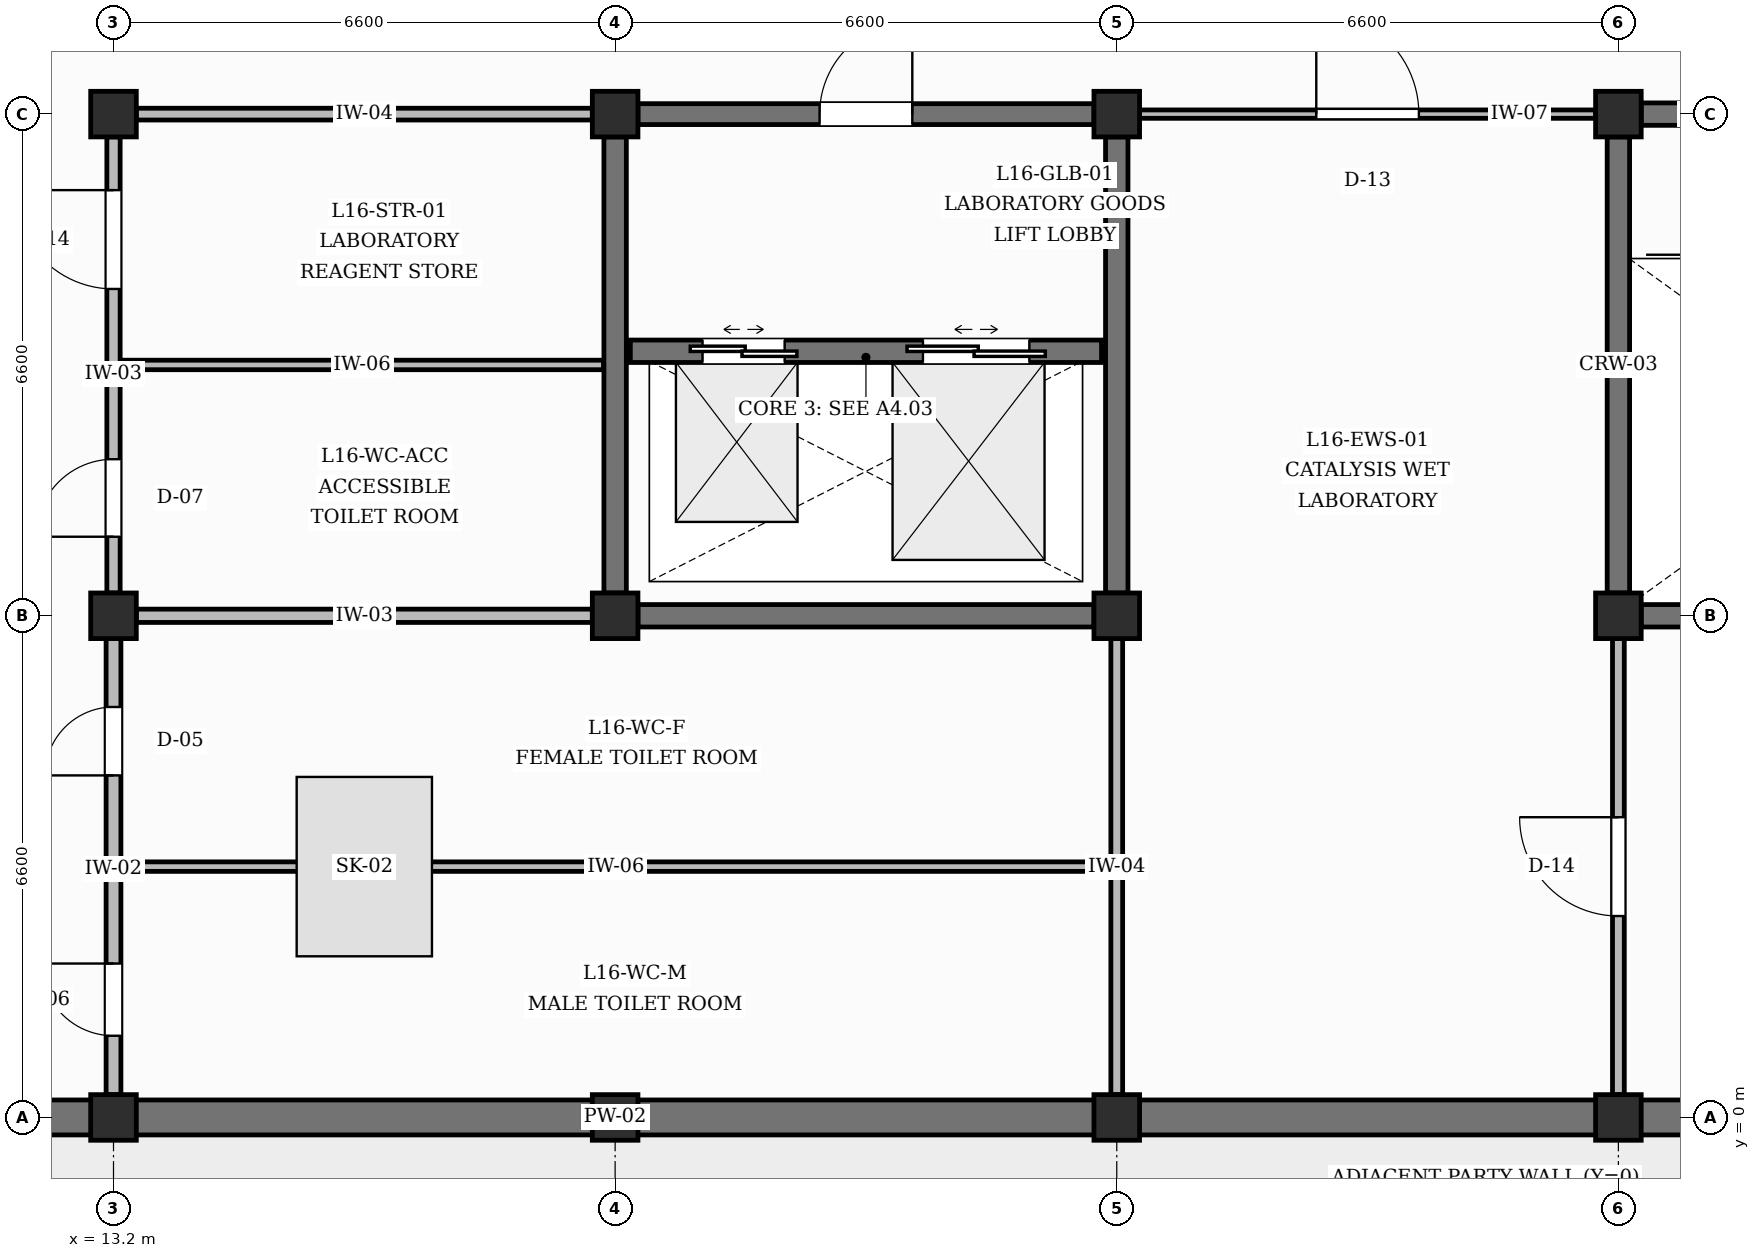
"""IFC4 building model, lengths in metres.
Left out: names, types, materials, properties, quantities, classifications, styles, units other than length and angle.
Written with IfcOpenShell. Run it as: python <this file> out.ifc"""

import sys

from ifc_helpers import new_model, si_unit, direction, frame, frame_2d, origin, origin_2d, place, context, subcontext, project, spatial, rectangle, extrude, element, fill, save


model = new_model("IFC4")
c1 = context("Model", 3, precision=1e-05, world=origin(), true_north=direction((0.0, 1.0)))
c2 = subcontext(c1, "Body", "Model", "MODEL_VIEW")
j1 = project(units=[si_unit("LENGTHUNIT", "METRE"), si_unit("PLANEANGLEUNIT", "RADIAN")], contexts=[c1])
p1 = place(None, origin())
s1 = spatial("IfcSite", under=j1, at=p1, CompositionType="ELEMENT")
p2 = place(p1, origin())
s2 = spatial("IfcBuilding", under=s1, at=p2, CompositionType="ELEMENT")
p3 = place(p2, frame((0.0, 0.0, 69.0)))
s3 = spatial("IfcBuildingStorey", under=s2, at=p3, CompositionType="ELEMENT", Elevation=69.0)
for number, where, z_axis, x_axis in (
    (1, (13.2, 0.0, 0.0), (0.0, 0.0, 1.0), (1.0, 0.0, 0.0)),
    (2, (13.2, 6.6, 0.0), (0.0, 0.0, 1.0), (1.0, 0.0, 0.0)),
    (3, (13.2, 13.2, 0.0), (0.0, 0.0, 1.0), (1.0, 0.0, 0.0)),
    (4, (19.8, 0.0, 0.0), (0.0, 0.0, 1.0), (1.0, 0.0, 0.0)),
    (5, (19.8, 6.6, 0.0), (0.0, 0.0, 1.0), (1.0, 0.0, 0.0)),
    (6, (19.8, 13.2, 0.0), (0.0, 0.0, 1.0), (1.0, 0.0, 0.0)),
    (7, (26.4, 0.0, 0.0), (0.0, 0.0, 1.0), (1.0, 0.0, 0.0)),
    (8, (26.4, 6.6, 0.0), (0.0, 0.0, 1.0), (1.0, 0.0, 0.0)),
    (9, (26.4, 13.2, 0.0), (0.0, 0.0, 1.0), (1.0, 0.0, 0.0)),
    (10, (33.0, 0.0, 0.0), (0.0, 0.0, 1.0), (1.0, 0.0, 0.0)),
    (11, (33.0, 6.6, 0.0), (0.0, 0.0, 1.0), (1.0, 0.0, 0.0)),
    (12, (33.0, 13.2, 0.0), (0.0, 0.0, 1.0), (1.0, 0.0, 0.0)),
):
    element("IfcColumn", number, at=place(p3, frame(where, z_axis=z_axis, x_axis=x_axis)), inside=s3, PredefinedType="COLUMN", context=c2, shape_type="SweptSolid", body=[
        extrude(rectangle(XDim=0.6, YDim=0.6, at=origin_2d()), origin(), (0.0, 0.0, 1.0), 4.2),
    ])
for number, where, z_axis, x_axis in (
    (13, (6.9, 0.0, 0.0), (0.0, 0.0, 1.0), (1.0, 0.0, 0.0)),
    (14, (13.5, 0.0, 0.0), (0.0, 0.0, 1.0), (1.0, 0.0, 0.0)),
    (15, (20.1, 0.0, 0.0), (0.0, 0.0, 1.0), (1.0, 0.0, 0.0)),
    (16, (26.7, 0.0, 0.0), (0.0, 0.0, 1.0), (1.0, 0.0, 0.0)),
    (17, (33.3, 0.0, 0.0), (0.0, 0.0, 1.0), (1.0, 0.0, 0.0)),
):
    element("IfcWall", number, at=place(p3, frame(where, z_axis=z_axis, x_axis=x_axis)), inside=s3, PredefinedType="SOLIDWALL", context=c2, shape_type="SweptSolid", body=[
        extrude(rectangle(XDim=6.0, YDim=0.46, at=frame_2d((3.0, 0.0))), origin(), (0.0, 0.0, 1.0), 3.32),
    ])
p4 = place(p3, frame((33.3, 6.6, 0.0), z_axis=(0.0, 0.0, 1.0), x_axis=(1.0, 0.0, 0.0)))
e18 = element("IfcWall", 18, at=p4, inside=s3, PredefinedType="SHEAR", context=c2, shape_type="SweptSolid", body=[
    extrude(rectangle(XDim=6.0, YDim=0.295, at=frame_2d((3.0, 0.0))), origin(), (0.0, 0.0, 1.0), 3.56),
])
p5 = place(p3, frame((33.3, 13.2, 0.0), z_axis=(0.0, 0.0, 1.0), x_axis=(1.0, 0.0, 0.0)))
e19 = element("IfcWall", 19, at=p5, inside=s3, PredefinedType="SHEAR", context=c2, shape_type="SweptSolid", body=[
    extrude(rectangle(XDim=6.0, YDim=0.295, at=frame_2d((3.0, 0.0))), origin(), (0.0, 0.0, 1.0), 3.56),
])
p6 = place(p5, frame((2.425, 0.0, 0.0)))
e20 = element("IfcOpeningElement", 20, at=p6, cuts=e19, PredefinedType="OPENING", context=c2, shape_type="SweptSolid", body=[
    extrude(rectangle(XDim=1.15, YDim=2.2, at=frame_2d((0.575, 1.1))), frame((0.0, 0.157, 0.0), z_axis=(0.0, -1.0, 0.0), x_axis=(1.0, 0.0, 0.0)), (0.0, 0.0, 1.0), 0.315),
])
p7 = place(p3, frame((33.0, 6.9, 0.0), z_axis=(0.0, 0.0, 1.0), x_axis=(0.0, 1.0, 0.0)))
e21 = element("IfcWall", 21, at=p7, inside=s3, PredefinedType="SHEAR", context=c2, shape_type="SweptSolid", body=[
    extrude(rectangle(XDim=6.0, YDim=0.295, at=frame_2d((3.0, 0.0))), origin(), (0.0, 0.0, 1.0), 3.62),
])
p8 = place(p3, frame((20.1, 6.6, 0.0), z_axis=(0.0, 0.0, 1.0), x_axis=(1.0, 0.0, 0.0)))
e22 = element("IfcWall", 22, at=p8, inside=s3, PredefinedType="SHEAR", context=c2, shape_type="SweptSolid", body=[
    extrude(rectangle(XDim=6.0, YDim=0.295, at=frame_2d((3.0, 0.0))), origin(), (0.0, 0.0, 1.0), 3.56),
])
for number, where, z_axis, x_axis in (
    (23, (19.8, 6.9, 0.0), (0.0, 0.0, 1.0), (0.0, 1.0, 0.0)),
    (24, (26.4, 6.9, 0.0), (0.0, 0.0, 1.0), (0.0, 1.0, 0.0)),
):
    element("IfcWall", number, at=place(p3, frame(where, z_axis=z_axis, x_axis=x_axis)), inside=s3, PredefinedType="SHEAR", context=c2, shape_type="SweptSolid", body=[
        extrude(rectangle(XDim=6.0, YDim=0.295, at=frame_2d((3.0, 0.0))), origin(), (0.0, 0.0, 1.0), 3.62),
    ])
p9 = place(p3, frame((20.1, 13.2, 0.0), z_axis=(0.0, 0.0, 1.0), x_axis=(1.0, 0.0, 0.0)))
e25 = element("IfcWall", 25, at=p9, inside=s3, PredefinedType="SHEAR", context=c2, shape_type="SweptSolid", body=[
    extrude(rectangle(XDim=6.0, YDim=0.275, at=frame_2d((3.0, 0.0))), origin(), (0.0, 0.0, 1.0), 3.56),
])
p10 = place(p9, frame((2.39, 0.0, 0.0)))
e26 = element("IfcOpeningElement", 26, at=p10, cuts=e25, PredefinedType="OPENING", context=c2, shape_type="SweptSolid", body=[
    extrude(rectangle(XDim=1.22, YDim=2.15, at=frame_2d((0.61, 1.075))), frame((0.0, 0.147, 0.0), z_axis=(0.0, -1.0, 0.0), x_axis=(1.0, 0.0, 0.0)), (0.0, 0.0, 1.0), 0.295),
])
p11 = place(p3, frame((20.0, 10.08, 0.0), z_axis=(0.0, 0.0, 1.0), x_axis=(1.0, 0.0, 0.0)))
e27 = element("IfcWall", 27, at=p11, inside=s3, PredefinedType="SHEAR", context=c2, shape_type="SweptSolid", body=[
    extrude(rectangle(XDim=6.2, YDim=0.295, at=frame_2d((3.1, 0.0))), origin(), (0.0, 0.0, 1.0), 3.92),
])
p12 = place(p11, frame((0.95, 0.0, 0.0)))
e28 = element("IfcOpeningElement", 28, at=p12, cuts=e27, PredefinedType="OPENING", context=c2, shape_type="SweptSolid", body=[
    extrude(rectangle(XDim=1.08, YDim=2.15, at=frame_2d((0.54, 1.075))), frame((0.0, 0.157, 0.0), z_axis=(0.0, -1.0, 0.0), x_axis=(1.0, 0.0, 0.0)), (0.0, 0.0, 1.0), 0.315),
])
p13 = place(p11, frame((3.85, 0.0, 0.0)))
e29 = element("IfcOpeningElement", 29, at=p13, cuts=e27, PredefinedType="OPENING", context=c2, shape_type="SweptSolid", body=[
    extrude(rectangle(XDim=1.4, YDim=2.35, at=frame_2d((0.7, 1.175))), frame((0.0, 0.157, 0.0), z_axis=(0.0, -1.0, 0.0), x_axis=(1.0, 0.0, 0.0)), (0.0, 0.0, 1.0), 0.315),
])
p14 = place(p3, frame((13.2, 0.3, 0.0), z_axis=(0.0, 0.0, 1.0), x_axis=(0.0, 1.0, 0.0)))
e30 = element("IfcWall", 30, at=p14, inside=s3, PredefinedType="PARTITIONING", context=c2, shape_type="SweptSolid", body=[
    extrude(rectangle(XDim=6.0, YDim=0.195, at=frame_2d((3.0, 0.0))), origin(), (0.0, 0.0, 1.0), 3.62),
])
p15 = place(p14, frame((0.775, 0.0, 0.0)))
e31 = element("IfcOpeningElement", 31, at=p15, cuts=e30, PredefinedType="OPENING", context=c2, shape_type="SweptSolid", body=[
    extrude(rectangle(XDim=0.95, YDim=2.1, at=frame_2d((0.475, 1.05))), frame((0.0, 0.107, 0.0), z_axis=(0.0, -1.0, 0.0), x_axis=(1.0, 0.0, 0.0)), (0.0, 0.0, 1.0), 0.215),
])
p16 = place(p14, frame((4.2, 0.0, 0.0)))
e32 = element("IfcOpeningElement", 32, at=p16, cuts=e30, PredefinedType="OPENING", context=c2, shape_type="SweptSolid", body=[
    extrude(rectangle(XDim=0.9, YDim=2.1, at=frame_2d((0.45, 1.05))), frame((0.0, 0.107, 0.0), z_axis=(0.0, -1.0, 0.0), x_axis=(1.0, 0.0, 0.0)), (0.0, 0.0, 1.0), 0.215),
])
p17 = place(p3, frame((26.4, 0.3, 0.0), z_axis=(0.0, 0.0, 1.0), x_axis=(0.0, 1.0, 0.0)))
e33 = element("IfcWall", 33, at=p17, inside=s3, PredefinedType="PARTITIONING", context=c2, shape_type="SweptSolid", body=[
    extrude(rectangle(XDim=6.0, YDim=0.155, at=frame_2d((3.0, 0.0))), origin(), (0.0, 0.0, 1.0), 3.62),
])
p18 = place(p3, frame((13.5, 6.6, 0.0), z_axis=(0.0, 0.0, 1.0), x_axis=(1.0, 0.0, 0.0)))
e34 = element("IfcWall", 34, at=p18, inside=s3, PredefinedType="PARTITIONING", context=c2, shape_type="SweptSolid", body=[
    extrude(rectangle(XDim=6.0, YDim=0.175, at=frame_2d((3.0, 0.0))), origin(), (0.0, 0.0, 1.0), 3.56),
])
p19 = place(p3, frame((13.2, 6.9, 0.0), z_axis=(0.0, 0.0, 1.0), x_axis=(0.0, 1.0, 0.0)))
e35 = element("IfcWall", 35, at=p19, inside=s3, PredefinedType="PARTITIONING", context=c2, shape_type="SweptSolid", body=[
    extrude(rectangle(XDim=6.0, YDim=0.175, at=frame_2d((3.0, 0.0))), origin(), (0.0, 0.0, 1.0), 3.62),
])
p20 = place(p19, frame((0.74, 0.0, 0.0)))
e36 = element("IfcOpeningElement", 36, at=p20, cuts=e35, PredefinedType="OPENING", context=c2, shape_type="SweptSolid", body=[
    extrude(rectangle(XDim=1.02, YDim=2.15, at=frame_2d((0.51, 1.075))), frame((0.0, 0.097, 0.0), z_axis=(0.0, -1.0, 0.0), x_axis=(1.0, 0.0, 0.0)), (0.0, 0.0, 1.0), 0.195),
])
p21 = place(p19, frame((4.0, 0.0, 0.0)))
e37 = element("IfcOpeningElement", 37, at=p21, cuts=e35, PredefinedType="OPENING", context=c2, shape_type="SweptSolid", body=[
    extrude(rectangle(XDim=1.3, YDim=2.3, at=frame_2d((0.65, 1.15))), frame((0.0, 0.097, 0.0), z_axis=(0.0, -1.0, 0.0), x_axis=(1.0, 0.0, 0.0)), (0.0, 0.0, 1.0), 0.195),
])
p22 = place(p3, frame((13.5, 13.2, 0.0), z_axis=(0.0, 0.0, 1.0), x_axis=(1.0, 0.0, 0.0)))
e38 = element("IfcWall", 38, at=p22, inside=s3, PredefinedType="PARTITIONING", context=c2, shape_type="SweptSolid", body=[
    extrude(rectangle(XDim=6.0, YDim=0.155, at=frame_2d((3.0, 0.0))), origin(), (0.0, 0.0, 1.0), 3.56),
])
p23 = place(p3, frame((33.0, 0.3, 0.0), z_axis=(0.0, 0.0, 1.0), x_axis=(0.0, 1.0, 0.0)))
e39 = element("IfcWall", 39, at=p23, inside=s3, PredefinedType="PARTITIONING", context=c2, shape_type="SweptSolid", body=[
    extrude(rectangle(XDim=6.0, YDim=0.155, at=frame_2d((3.0, 0.0))), origin(), (0.0, 0.0, 1.0), 3.62),
])
p24 = place(p23, frame((2.35, 0.0, 0.0)))
e40 = element("IfcOpeningElement", 40, at=p24, cuts=e39, PredefinedType="OPENING", context=c2, shape_type="SweptSolid", body=[
    extrude(rectangle(XDim=1.3, YDim=2.3, at=frame_2d((0.65, 1.15))), frame((0.0, 0.087, 0.0), z_axis=(0.0, -1.0, 0.0), x_axis=(1.0, 0.0, 0.0)), (0.0, 0.0, 1.0), 0.175),
])
p25 = place(p3, frame((26.7, 13.2, 0.0), z_axis=(0.0, 0.0, 1.0), x_axis=(1.0, 0.0, 0.0)))
e41 = element("IfcWall", 41, at=p25, inside=s3, PredefinedType="PARTITIONING", context=c2, shape_type="SweptSolid", body=[
    extrude(rectangle(XDim=6.0, YDim=0.11, at=frame_2d((3.0, 0.0))), origin(), (0.0, 0.0, 1.0), 3.56),
])
p26 = place(p25, frame((2.325, 0.0, 0.0)))
e42 = element("IfcOpeningElement", 42, at=p26, cuts=e41, PredefinedType="OPENING", context=c2, shape_type="SweptSolid", body=[
    extrude(rectangle(XDim=1.35, YDim=2.3, at=frame_2d((0.675, 1.15))), frame((0.0, 0.065, 0.0), z_axis=(0.0, -1.0, 0.0), x_axis=(1.0, 0.0, 0.0)), (0.0, 0.0, 1.0), 0.13),
])
p27 = place(p3, frame((13.302, 3.3, 0.0), z_axis=(0.0, 0.0, 1.0), x_axis=(1.0, 0.0, 0.0)))
e43 = element("IfcWall", 43, at=p27, inside=s3, PredefinedType="PARTITIONING", context=c2, shape_type="SweptSolid", body=[
    extrude(rectangle(XDim=13.015, YDim=0.125, at=frame_2d((6.507, 0.0))), origin(), (0.0, 0.0, 1.0), 3.92),
])
p28 = place(p3, frame((13.292, 9.9, 0.0), z_axis=(0.0, 0.0, 1.0), x_axis=(1.0, 0.0, 0.0)))
e44 = element("IfcWall", 44, at=p28, inside=s3, PredefinedType="PARTITIONING", context=c2, shape_type="SweptSolid", body=[
    extrude(rectangle(XDim=6.355, YDim=0.125, at=frame_2d((3.177, 0.0))), origin(), (0.0, 0.0, 1.0), 3.92),
])
p29 = place(p2, frame((0.0, 0.0, 73.2)))
p30 = place(p29, frame((0.0, 0.0, -0.28)))
p31 = place(p30, frame((16.5, 3.3, 0.23)))
e45 = element("IfcWindow", 45, at=p31, inside=s3, PartitioningType="SINGLE_PANEL", PredefinedType="SKYLIGHT", context=c2, shape_type="SweptSolid", body=[
    extrude(rectangle(XDim=1.78, YDim=2.36, at=origin_2d()), origin(), (0.0, 0.0, 1.0), 0.05),
])
p32 = place(p12, origin())
e46 = element("IfcDoor", 46, at=p32, inside=s3, OperationType="DOUBLE_DOOR_SLIDING", PredefinedType="USERDEFINED", context=c2, shape_type="SweptSolid", body=[
    extrude(rectangle(XDim=1.08, YDim=2.15, at=frame_2d((0.54, 1.075))), frame((0.0, 0.025, 0.0), z_axis=(0.0, -1.0, 0.0), x_axis=(1.0, 0.0, 0.0)), (0.0, 0.0, 1.0), 0.05),
])
fill(e28, e46)
p33 = place(p13, origin())
e47 = element("IfcDoor", 47, at=p33, inside=s3, OperationType="DOUBLE_DOOR_SLIDING", PredefinedType="USERDEFINED", context=c2, shape_type="SweptSolid", body=[
    extrude(rectangle(XDim=1.4, YDim=2.35, at=frame_2d((0.7, 1.175))), frame((0.0, 0.025, 0.0), z_axis=(0.0, -1.0, 0.0), x_axis=(1.0, 0.0, 0.0)), (0.0, 0.0, 1.0), 0.05),
])
fill(e29, e47)
p34 = place(p10, origin())
e48 = element("IfcDoor", 48, at=p34, inside=s3, OperationType="SINGLE_SWING_RIGHT", PredefinedType="DOOR", context=c2, shape_type="SweptSolid", body=[
    extrude(rectangle(XDim=1.22, YDim=2.15, at=frame_2d((0.61, 1.075))), frame((0.0, 0.025, 0.0), z_axis=(0.0, -1.0, 0.0), x_axis=(1.0, 0.0, 0.0)), (0.0, 0.0, 1.0), 0.05),
])
fill(e26, e48)
p35 = place(p15, origin())
e49 = element("IfcDoor", 49, at=p35, inside=s3, OperationType="SINGLE_SWING_RIGHT", PredefinedType="DOOR", context=c2, shape_type="SweptSolid", body=[
    extrude(rectangle(XDim=0.95, YDim=2.1, at=frame_2d((0.475, 1.05))), frame((0.0, 0.025, 0.0), z_axis=(0.0, -1.0, 0.0), x_axis=(1.0, 0.0, 0.0)), (0.0, 0.0, 1.0), 0.05),
])
fill(e31, e49)
p36 = place(p16, origin())
e50 = element("IfcDoor", 50, at=p36, inside=s3, OperationType="SINGLE_SWING_LEFT", PredefinedType="DOOR", context=c2, shape_type="SweptSolid", body=[
    extrude(rectangle(XDim=0.9, YDim=2.1, at=frame_2d((0.45, 1.05))), frame((0.0, 0.025, 0.0), z_axis=(0.0, -1.0, 0.0), x_axis=(1.0, 0.0, 0.0)), (0.0, 0.0, 1.0), 0.05),
])
fill(e32, e50)
p37 = place(p20, origin())
e51 = element("IfcDoor", 51, at=p37, inside=s3, OperationType="SINGLE_SWING_LEFT", PredefinedType="DOOR", context=c2, shape_type="SweptSolid", body=[
    extrude(rectangle(XDim=1.02, YDim=2.15, at=frame_2d((0.51, 1.075))), frame((0.0, 0.025, 0.0), z_axis=(0.0, -1.0, 0.0), x_axis=(1.0, 0.0, 0.0)), (0.0, 0.0, 1.0), 0.05),
])
fill(e36, e51)
p38 = place(p21, origin())
e52 = element("IfcDoor", 52, at=p38, inside=s3, OperationType="SINGLE_SWING_RIGHT", PredefinedType="DOOR", context=c2, shape_type="SweptSolid", body=[
    extrude(rectangle(XDim=1.3, YDim=2.3, at=frame_2d((0.65, 1.15))), frame((0.0, 0.025, 0.0), z_axis=(0.0, -1.0, 0.0), x_axis=(1.0, 0.0, 0.0)), (0.0, 0.0, 1.0), 0.05),
])
fill(e37, e52)
p39 = place(p26, origin())
e53 = element("IfcDoor", 53, at=p39, inside=s3, OperationType="SINGLE_SWING_LEFT", PredefinedType="DOOR", context=c2, shape_type="SweptSolid", body=[
    extrude(rectangle(XDim=1.35, YDim=2.3, at=frame_2d((0.675, 1.15))), frame((0.0, 0.025, 0.0), z_axis=(0.0, -1.0, 0.0), x_axis=(1.0, 0.0, 0.0)), (0.0, 0.0, 1.0), 0.05),
])
fill(e42, e53)
p40 = place(p24, origin())
e54 = element("IfcDoor", 54, at=p40, inside=s3, OperationType="SINGLE_SWING_RIGHT", PredefinedType="DOOR", context=c2, shape_type="SweptSolid", body=[
    extrude(rectangle(XDim=1.3, YDim=2.3, at=frame_2d((0.65, 1.15))), frame((0.0, 0.025, 0.0), z_axis=(0.0, -1.0, 0.0), x_axis=(1.0, 0.0, 0.0)), (0.0, 0.0, 1.0), 0.05),
])
fill(e40, e54)
save(model, sys.argv[1])
